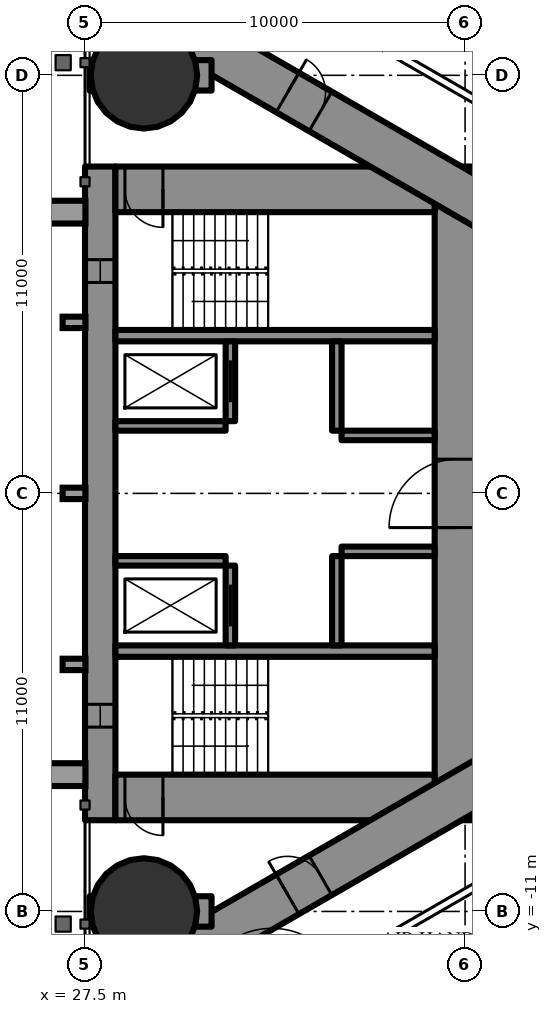
"""IFC4 building model, lengths in metres.
Left out: names, types, materials, properties, quantities, classifications, styles, units other than length and angle.
Written with IfcOpenShell. Run it as: python <this file> out.ifc"""

import sys

from ifc_helpers import new_model, si_unit, direction, frame, frame_2d, origin, origin_2d, place, context, subcontext, project, spatial, rectangle, circle, extrude, element, fill, save


model = new_model("IFC4")
c1 = context("Model", 3, precision=1e-05, world=origin(), true_north=direction((0.0, 1.0)))
c2 = subcontext(c1, "Body", "Model", "MODEL_VIEW")
j1 = project(units=[si_unit("LENGTHUNIT", "METRE"), si_unit("PLANEANGLEUNIT", "RADIAN")], contexts=[c1])
p1 = place(None, origin())
s1 = spatial("IfcSite", under=j1, at=p1, CompositionType="ELEMENT")
p2 = place(p1, origin())
s2 = spatial("IfcBuilding", under=s1, at=p2, CompositionType="ELEMENT")
p3 = place(p2, frame((0.0, 0.0, 201.8)))
s3 = spatial("IfcBuildingStorey", under=s2, at=p3, CompositionType="ELEMENT", Elevation=201.8)
for number, where, z_axis, x_axis in (
    (1, (29.05, 11.0, 0.0), (0.0, 0.0, 1.0), (1.0, 0.0, 0.0)),
    (2, (29.05, -11.0, 0.0), (0.0, 0.0, 1.0), (1.0, 0.0, 0.0)),
):
    element("IfcColumn", number, at=place(p3, frame(where, z_axis=z_axis, x_axis=x_axis)), inside=s3, PredefinedType="COLUMN", context=c2, shape_type="SweptSolid", body=[
        extrude(circle(Radius=1.4, at=origin_2d()), origin(), (0.0, 0.0, 1.0), 3.5),
    ])
p4 = place(p3, frame((27.9, -8.6, 0.0), z_axis=(0.0, 0.0, 1.0), x_axis=(0.0, 1.0, 0.0)))
e3 = element("IfcWall", 3, at=p4, inside=s3, PredefinedType="SHEAR", context=c2, shape_type="SweptSolid", body=[
    extrude(rectangle(XDim=17.2, YDim=0.8, at=frame_2d((8.6, 0.0))), origin(), (0.0, 0.0, 1.0), 3.5),
])
p5 = place(p4, frame((2.45, 0.0, 0.6)))
e4 = element("IfcOpeningElement", 4, at=p5, cuts=e3, PredefinedType="OPENING", context=c2, shape_type="SweptSolid", body=[
    extrude(rectangle(XDim=0.6, YDim=2.1, at=frame_2d((0.3, 1.05))), frame((0.0, 0.41, 0.0), z_axis=(0.0, -1.0, 0.0), x_axis=(1.0, 0.0, 0.0)), (0.0, 0.0, 1.0), 0.82),
])
p6 = place(p4, frame((14.15, 0.0, 0.6)))
e5 = element("IfcOpeningElement", 5, at=p6, cuts=e3, PredefinedType="OPENING", context=c2, shape_type="SweptSolid", body=[
    extrude(rectangle(XDim=0.6, YDim=2.1, at=frame_2d((0.3, 1.05))), frame((0.0, 0.41, 0.0), z_axis=(0.0, -1.0, 0.0), x_axis=(1.0, 0.0, 0.0)), (0.0, 0.0, 1.0), 0.82),
])
p7 = place(p3, frame((37.3, -8.6, 0.0), z_axis=(0.0, 0.0, 1.0), x_axis=(0.0, 1.0, 0.0)))
e6 = element("IfcWall", 6, at=p7, inside=s3, PredefinedType="SHEAR", context=c2, shape_type="SweptSolid", body=[
    extrude(rectangle(XDim=17.2, YDim=1.2, at=frame_2d((8.6, 0.0))), origin(), (0.0, 0.0, 1.0), 3.5),
])
p8 = place(p7, frame((7.7, 0.0, 0.0)))
e7 = element("IfcOpeningElement", 7, at=p8, cuts=e6, PredefinedType="OPENING", context=c2, shape_type="SweptSolid", body=[
    extrude(rectangle(XDim=1.8, YDim=2.2, at=frame_2d((0.9, 1.1))), frame((0.0, 0.61, 0.0), z_axis=(0.0, -1.0, 0.0), x_axis=(1.0, 0.0, 0.0)), (0.0, 0.0, 1.0), 1.22),
])
p9 = place(p3, frame((28.3, -8.0, 0.0), z_axis=(0.0, 0.0, 1.0), x_axis=(1.0, 0.0, 0.0)))
e8 = element("IfcWall", 8, at=p9, inside=s3, PredefinedType="SHEAR", context=c2, shape_type="SweptSolid", body=[
    extrude(rectangle(XDim=8.4, YDim=1.2, at=frame_2d((4.2, 0.0))), origin(), (0.0, 0.0, 1.0), 3.5),
])
p10 = place(p9, frame((0.25, 0.0, 0.0)))
e9 = element("IfcOpeningElement", 9, at=p10, cuts=e8, PredefinedType="OPENING", context=c2, shape_type="SweptSolid", body=[
    extrude(rectangle(XDim=1.0, YDim=2.2, at=frame_2d((0.5, 1.1))), frame((0.0, 0.61, 0.0), z_axis=(0.0, -1.0, 0.0), x_axis=(1.0, 0.0, 0.0)), (0.0, 0.0, 1.0), 1.22),
])
p11 = place(p3, frame((28.3, 8.0, 0.0), z_axis=(0.0, 0.0, 1.0), x_axis=(1.0, 0.0, 0.0)))
e10 = element("IfcWall", 10, at=p11, inside=s3, PredefinedType="SHEAR", context=c2, shape_type="SweptSolid", body=[
    extrude(rectangle(XDim=8.4, YDim=1.2, at=frame_2d((4.2, 0.0))), origin(), (0.0, 0.0, 1.0), 3.5),
])
p12 = place(p11, frame((0.25, 0.0, 0.0)))
e11 = element("IfcOpeningElement", 11, at=p12, cuts=e10, PredefinedType="OPENING", context=c2, shape_type="SweptSolid", body=[
    extrude(rectangle(XDim=1.0, YDim=2.2, at=frame_2d((0.5, 1.1))), frame((0.0, 0.61, 0.0), z_axis=(0.0, -1.0, 0.0), x_axis=(1.0, 0.0, 0.0)), (0.0, 0.0, 1.0), 1.22),
])
for number, where, z_axis, x_axis in (
    (12, (28.3, -4.15, 0.0), (0.0, 0.0, 1.0), (1.0, 0.0, 0.0)),
    (13, (28.3, 4.15, 0.0), (0.0, 0.0, 1.0), (1.0, 0.0, 0.0)),
):
    element("IfcWall", number, at=place(p3, frame(where, z_axis=z_axis, x_axis=x_axis)), inside=s3, PredefinedType="SHEAR", context=c2, shape_type="SweptSolid", body=[
        extrude(rectangle(XDim=8.4, YDim=0.3, at=frame_2d((4.2, 0.0))), origin(), (0.0, 0.0, 1.0), 3.5),
    ])
p13 = place(p3, frame((31.325, -4.0, 0.0), z_axis=(0.0, 0.0, 1.0), x_axis=(0.0, 1.0, 0.0)))
e14 = element("IfcWall", 14, at=p13, inside=s3, PredefinedType="SHEAR", context=c2, shape_type="SweptSolid", body=[
    extrude(rectangle(XDim=2.1, YDim=0.25, at=frame_2d((1.05, 0.0))), origin(), (0.0, 0.0, 1.0), 3.5),
])
p14 = place(p13, frame((0.5, 0.0, 0.0)))
e15 = element("IfcOpeningElement", 15, at=p14, cuts=e14, PredefinedType="OPENING", context=c2, shape_type="SweptSolid", body=[
    extrude(rectangle(XDim=1.1, YDim=2.2, at=frame_2d((0.55, 1.1))), frame((0.0, 0.135, 0.0), z_axis=(0.0, -1.0, 0.0), x_axis=(1.0, 0.0, 0.0)), (0.0, 0.0, 1.0), 0.27),
])
p15 = place(p3, frame((34.125, -4.0, 0.0), z_axis=(0.0, 0.0, 1.0), x_axis=(0.0, 1.0, 0.0)))
e16 = element("IfcWall", 16, at=p15, inside=s3, PredefinedType="SHEAR", context=c2, shape_type="SweptSolid", body=[
    extrude(rectangle(XDim=2.35, YDim=0.25, at=frame_2d((1.175, 0.0))), origin(), (0.0, 0.0, 1.0), 3.5),
])
p16 = place(p3, frame((28.3, -1.775, 0.0), z_axis=(0.0, 0.0, 1.0), x_axis=(1.0, 0.0, 0.0)))
e17 = element("IfcWall", 17, at=p16, inside=s3, PredefinedType="SHEAR", context=c2, shape_type="SweptSolid", body=[
    extrude(rectangle(XDim=2.9, YDim=0.25, at=frame_2d((1.45, 0.0))), origin(), (0.0, 0.0, 1.0), 3.5),
])
p17 = place(p3, frame((34.25, -1.525, 0.0), z_axis=(0.0, 0.0, 1.0), x_axis=(1.0, 0.0, 0.0)))
e18 = element("IfcWall", 18, at=p17, inside=s3, PredefinedType="SHEAR", context=c2, shape_type="SweptSolid", body=[
    extrude(rectangle(XDim=2.45, YDim=0.25, at=frame_2d((1.225, 0.0))), origin(), (0.0, 0.0, 1.0), 3.5),
])
p18 = place(p3, frame((31.325, 1.9, 0.0), z_axis=(0.0, 0.0, 1.0), x_axis=(0.0, 1.0, 0.0)))
e19 = element("IfcWall", 19, at=p18, inside=s3, PredefinedType="SHEAR", context=c2, shape_type="SweptSolid", body=[
    extrude(rectangle(XDim=2.1, YDim=0.25, at=frame_2d((1.05, 0.0))), origin(), (0.0, 0.0, 1.0), 3.5),
])
p19 = place(p18, frame((0.5, 0.0, 0.0)))
e20 = element("IfcOpeningElement", 20, at=p19, cuts=e19, PredefinedType="OPENING", context=c2, shape_type="SweptSolid", body=[
    extrude(rectangle(XDim=1.1, YDim=2.2, at=frame_2d((0.55, 1.1))), frame((0.0, 0.135, 0.0), z_axis=(0.0, -1.0, 0.0), x_axis=(1.0, 0.0, 0.0)), (0.0, 0.0, 1.0), 0.27),
])
p20 = place(p3, frame((34.125, 1.65, 0.0), z_axis=(0.0, 0.0, 1.0), x_axis=(0.0, 1.0, 0.0)))
e21 = element("IfcWall", 21, at=p20, inside=s3, PredefinedType="SHEAR", context=c2, shape_type="SweptSolid", body=[
    extrude(rectangle(XDim=2.35, YDim=0.25, at=frame_2d((1.175, 0.0))), origin(), (0.0, 0.0, 1.0), 3.5),
])
p21 = place(p3, frame((28.3, 1.775, 0.0), z_axis=(0.0, 0.0, 1.0), x_axis=(1.0, 0.0, 0.0)))
e22 = element("IfcWall", 22, at=p21, inside=s3, PredefinedType="SHEAR", context=c2, shape_type="SweptSolid", body=[
    extrude(rectangle(XDim=2.9, YDim=0.25, at=frame_2d((1.45, 0.0))), origin(), (0.0, 0.0, 1.0), 3.5),
])
p22 = place(p3, frame((34.25, 1.525, 0.0), z_axis=(0.0, 0.0, 1.0), x_axis=(1.0, 0.0, 0.0)))
e23 = element("IfcWall", 23, at=p22, inside=s3, PredefinedType="SHEAR", context=c2, shape_type="SweptSolid", body=[
    extrude(rectangle(XDim=2.45, YDim=0.25, at=frame_2d((1.225, 0.0))), origin(), (0.0, 0.0, 1.0), 3.5),
])
p23 = place(p3, frame((27.2, -13.8, 0.0), z_axis=(0.0, 0.0, 1.0), x_axis=(0.866027159892, 0.499996958321, 0.0)))
e24 = element("IfcWall", 24, at=p23, inside=s3, PredefinedType="SHEAR", context=c2, shape_type="SweptSolid", body=[
    extrude(rectangle(XDim=27.947, YDim=1.2, at=frame_2d((13.973, 0.0))), origin(), (0.0, 0.0, 1.0), 3.5),
])
p24 = place(p23, frame((6.5, 0.0, 0.0)))
e25 = element("IfcOpeningElement", 25, at=p24, cuts=e24, PredefinedType="OPENING", context=c2, shape_type="SweptSolid", body=[
    extrude(rectangle(XDim=1.0, YDim=2.2, at=frame_2d((0.5, 1.1))), frame((0.0, 0.61, 0.0), z_axis=(0.0, -1.0, 0.0), x_axis=(1.0, 0.0, 0.0)), (0.0, 0.0, 1.0), 1.22),
])
p25 = place(p23, frame((14.045, 0.0, 0.0)))
e26 = element("IfcOpeningElement", 26, at=p25, cuts=e24, PredefinedType="OPENING", context=c2, shape_type="SweptSolid", body=[
    extrude(rectangle(XDim=1.8, YDim=2.2, at=frame_2d((0.9, 1.1))), frame((0.0, 0.61, 0.0), z_axis=(0.0, -1.0, 0.0), x_axis=(1.0, 0.0, 0.0)), (0.0, 0.0, 1.0), 1.22),
])
p26 = place(p3, frame((27.2, 13.8, 0.0), z_axis=(0.0, 0.0, 1.0), x_axis=(0.866024515034, -0.500001539357, 0.0)))
e27 = element("IfcWall", 27, at=p26, inside=s3, PredefinedType="SHEAR", context=c2, shape_type="SweptSolid", body=[
    extrude(rectangle(XDim=26.907, YDim=1.2, at=frame_2d((13.454, 0.0))), origin(), (0.0, 0.0, 1.0), 3.5),
])
p27 = place(p26, frame((6.5, 0.0, 0.0)))
e28 = element("IfcOpeningElement", 28, at=p27, cuts=e27, PredefinedType="OPENING", context=c2, shape_type="SweptSolid", body=[
    extrude(rectangle(XDim=1.0, YDim=2.2, at=frame_2d((0.5, 1.1))), frame((0.0, 0.61, 0.0), z_axis=(0.0, -1.0, 0.0), x_axis=(1.0, 0.0, 0.0)), (0.0, 0.0, 1.0), 1.22),
])
p28 = place(p26, frame((12.545, 0.0, 0.0)))
e29 = element("IfcOpeningElement", 29, at=p28, cuts=e27, PredefinedType="OPENING", context=c2, shape_type="SweptSolid", body=[
    extrude(rectangle(XDim=1.8, YDim=2.2, at=frame_2d((0.9, 1.1))), frame((0.0, 0.61, 0.0), z_axis=(0.0, -1.0, 0.0), x_axis=(1.0, 0.0, 0.0)), (0.0, 0.0, 1.0), 1.22),
])
for number, where, z_axis, x_axis in (
    (30, (27.62, -11.0, 0.0), (0.0, 0.0, 1.0), (1.0, 0.0, 0.0)),
    (31, (27.62, 11.0, 0.0), (0.0, 0.0, 1.0), (1.0, 0.0, 0.0)),
):
    element("IfcWall", number, at=place(p3, frame(where, z_axis=z_axis, x_axis=x_axis)), inside=s3, PredefinedType="SHEAR", context=c2, shape_type="SweptSolid", body=[
        extrude(rectangle(XDim=3.209, YDim=0.8, at=frame_2d((1.605, 0.0))), origin(), (0.0, 0.0, 1.0), 3.5),
    ])
p29 = place(p3, frame((27.903, -16.05, 0.0), z_axis=(0.0, 0.0, 1.0), x_axis=(0.866022581743, 0.500004887887, 0.0)))
e32 = element("IfcWall", 32, at=p29, inside=s3, PredefinedType="PARTITIONING", context=c2, shape_type="SweptSolid", body=[
    extrude(rectangle(XDim=32.1, YDim=0.2, at=frame_2d((16.05, 0.0))), origin(), (0.0, 0.0, 1.0), 3.25),
])
p30 = place(p29, frame((5.212, 0.0, 0.0)))
e33 = element("IfcOpeningElement", 33, at=p30, cuts=e32, PredefinedType="OPENING", context=c2, shape_type="SweptSolid", body=[
    extrude(rectangle(XDim=2.0, YDim=2.4, at=frame_2d((1.0, 1.2))), frame((0.0, 0.11, 0.0), z_axis=(0.0, -1.0, 0.0), x_axis=(1.0, 0.0, 0.0)), (0.0, 0.0, 1.0), 0.22),
])
p31 = place(p29, frame((18.133, 0.0, 0.0)))
e34 = element("IfcOpeningElement", 34, at=p31, cuts=e32, PredefinedType="OPENING", context=c2, shape_type="SweptSolid", body=[
    extrude(rectangle(XDim=2.0, YDim=2.4, at=frame_2d((1.0, 1.2))), frame((0.0, 0.11, 0.0), z_axis=(0.0, -1.0, 0.0), x_axis=(1.0, 0.0, 0.0)), (0.0, 0.0, 1.0), 0.22),
])
p32 = place(p29, frame((24.717, 0.0, 0.0)))
e35 = element("IfcOpeningElement", 35, at=p32, cuts=e32, PredefinedType="OPENING", context=c2, shape_type="SweptSolid", body=[
    extrude(rectangle(XDim=2.0, YDim=2.4, at=frame_2d((1.0, 1.2))), frame((0.0, 0.11, 0.0), z_axis=(0.0, -1.0, 0.0), x_axis=(1.0, 0.0, 0.0)), (0.0, 0.0, 1.0), 0.22),
])
p33 = place(p29, frame((28.836, 0.0, 0.0)))
e36 = element("IfcOpeningElement", 36, at=p33, cuts=e32, PredefinedType="OPENING", context=c2, shape_type="SweptSolid", body=[
    extrude(rectangle(XDim=2.0, YDim=2.4, at=frame_2d((1.0, 1.2))), frame((0.0, 0.11, 0.0), z_axis=(0.0, -1.0, 0.0), x_axis=(1.0, 0.0, 0.0)), (0.0, 0.0, 1.0), 0.22),
])
p34 = place(p3, frame((27.903, 16.05, 0.0), z_axis=(0.0, 0.0, 1.0), x_axis=(0.866024818307, -0.500001014076, 0.0)))
e37 = element("IfcWall", 37, at=p34, inside=s3, PredefinedType="PARTITIONING", context=c2, shape_type="SweptSolid", body=[
    extrude(rectangle(XDim=21.723, YDim=0.2, at=frame_2d((10.862, 0.0))), origin(), (0.0, 0.0, 1.0), 3.25),
])
p35 = place(p34, frame((15.966, 0.0, 0.0)))
e38 = element("IfcOpeningElement", 38, at=p35, cuts=e37, PredefinedType="OPENING", context=c2, shape_type="SweptSolid", body=[
    extrude(rectangle(XDim=2.0, YDim=2.03, at=frame_2d((1.0, 1.015))), frame((0.0, 0.11, 0.0), z_axis=(0.0, -1.0, 0.0), x_axis=(1.0, 0.0, 0.0)), (0.0, 0.0, 1.0), 0.22),
])
p36 = place(p34, frame((5.662, 0.0, 0.0)))
e39 = element("IfcOpeningElement", 39, at=p36, cuts=e37, PredefinedType="OPENING", context=c2, shape_type="SweptSolid", body=[
    extrude(rectangle(XDim=2.0, YDim=2.4, at=frame_2d((1.0, 1.2))), frame((0.0, 0.11, 0.0), z_axis=(0.0, -1.0, 0.0), x_axis=(1.0, 0.0, 0.0)), (0.0, 0.0, 1.0), 0.22),
])
p37 = place(p34, frame((19.415, 0.0, 0.0)))
e40 = element("IfcOpeningElement", 40, at=p37, cuts=e37, PredefinedType="OPENING", context=c2, shape_type="SweptSolid", body=[
    extrude(rectangle(XDim=1.8, YDim=2.2, at=frame_2d((0.9, 1.1))), frame((0.0, 0.11, 0.0), z_axis=(0.0, -1.0, 0.0), x_axis=(1.0, 0.0, 0.0)), (0.0, 0.0, 1.0), 0.22),
])
p38 = place(p24, origin())
e41 = element("IfcDoor", 41, at=p38, inside=s3, OperationType="SINGLE_SWING_LEFT", PredefinedType="DOOR", context=c2, shape_type="SweptSolid", body=[
    extrude(rectangle(XDim=1.0, YDim=2.2, at=frame_2d((0.5, 1.1))), frame((0.0, 0.025, 0.0), z_axis=(0.0, -1.0, 0.0), x_axis=(1.0, 0.0, 0.0)), (0.0, 0.0, 1.0), 0.05),
])
fill(e25, e41)
p39 = place(p27, origin())
e42 = element("IfcDoor", 42, at=p39, inside=s3, OperationType="SINGLE_SWING_LEFT", PredefinedType="DOOR", context=c2, shape_type="SweptSolid", body=[
    extrude(rectangle(XDim=1.0, YDim=2.2, at=frame_2d((0.5, 1.1))), frame((0.0, 0.025, 0.0), z_axis=(0.0, -1.0, 0.0), x_axis=(1.0, 0.0, 0.0)), (0.0, 0.0, 1.0), 0.05),
])
fill(e28, e42)
p40 = place(p8, origin())
e43 = element("IfcDoor", 43, at=p40, inside=s3, OperationType="DOUBLE_DOOR_SINGLE_SWING", PredefinedType="DOOR", context=c2, shape_type="SweptSolid", body=[
    extrude(rectangle(XDim=1.8, YDim=2.2, at=frame_2d((0.9, 1.1))), frame((0.0, 0.025, 0.0), z_axis=(0.0, -1.0, 0.0), x_axis=(1.0, 0.0, 0.0)), (0.0, 0.0, 1.0), 0.05),
])
fill(e7, e43)
p41 = place(p10, origin())
e44 = element("IfcDoor", 44, at=p41, inside=s3, OperationType="SINGLE_SWING_RIGHT", PredefinedType="DOOR", context=c2, shape_type="SweptSolid", body=[
    extrude(rectangle(XDim=1.0, YDim=2.2, at=frame_2d((0.5, 1.1))), frame((0.0, 0.025, 0.0), z_axis=(0.0, -1.0, 0.0), x_axis=(1.0, 0.0, 0.0)), (0.0, 0.0, 1.0), 0.05),
])
fill(e9, e44)
p42 = place(p12, origin())
e45 = element("IfcDoor", 45, at=p42, inside=s3, OperationType="SINGLE_SWING_RIGHT", PredefinedType="DOOR", context=c2, shape_type="SweptSolid", body=[
    extrude(rectangle(XDim=1.0, YDim=2.2, at=frame_2d((0.5, 1.1))), frame((0.0, 0.025, 0.0), z_axis=(0.0, -1.0, 0.0), x_axis=(1.0, 0.0, 0.0)), (0.0, 0.0, 1.0), 0.05),
])
fill(e11, e45)
p43 = place(p14, origin())
e46 = element("IfcDoor", 46, at=p43, inside=s3, OperationType="SLIDING_TO_LEFT", PredefinedType="USERDEFINED", context=c2, shape_type="SweptSolid", body=[
    extrude(rectangle(XDim=1.1, YDim=2.2, at=frame_2d((0.55, 1.1))), frame((0.0, 0.025, 0.0), z_axis=(0.0, -1.0, 0.0), x_axis=(1.0, 0.0, 0.0)), (0.0, 0.0, 1.0), 0.05),
])
fill(e15, e46)
p44 = place(p19, origin())
e47 = element("IfcDoor", 47, at=p44, inside=s3, OperationType="SLIDING_TO_LEFT", PredefinedType="USERDEFINED", context=c2, shape_type="SweptSolid", body=[
    extrude(rectangle(XDim=1.1, YDim=2.2, at=frame_2d((0.55, 1.1))), frame((0.0, 0.025, 0.0), z_axis=(0.0, -1.0, 0.0), x_axis=(1.0, 0.0, 0.0)), (0.0, 0.0, 1.0), 0.05),
])
fill(e20, e47)
p45 = place(p5, origin())
e48 = element("IfcWindow", 48, at=p45, inside=s3, PartitioningType="SINGLE_PANEL", PredefinedType="WINDOW", context=c2, shape_type="SweptSolid", body=[
    extrude(rectangle(XDim=0.6, YDim=2.1, at=frame_2d((0.3, 1.05))), frame((0.0, 0.03, 0.0), z_axis=(0.0, -1.0, 0.0), x_axis=(1.0, 0.0, 0.0)), (0.0, 0.0, 1.0), 0.06),
])
fill(e4, e48)
p46 = place(p6, origin())
e49 = element("IfcWindow", 49, at=p46, inside=s3, PartitioningType="SINGLE_PANEL", PredefinedType="WINDOW", context=c2, shape_type="SweptSolid", body=[
    extrude(rectangle(XDim=0.6, YDim=2.1, at=frame_2d((0.3, 1.05))), frame((0.0, 0.03, 0.0), z_axis=(0.0, -1.0, 0.0), x_axis=(1.0, 0.0, 0.0)), (0.0, 0.0, 1.0), 0.06),
])
fill(e5, e49)
save(model, sys.argv[1])
